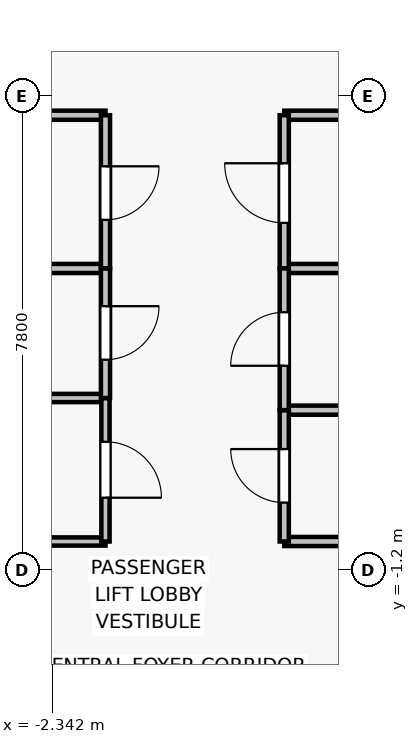
"""IFC4 building model, lengths in metres.
Left out: names, types, materials, properties, quantities, classifications, styles, units other than length and angle.
Written with IfcOpenShell. Run it as: python <this file> out.ifc"""

import sys

from ifc_helpers import new_model, si_unit, direction, frame, frame_2d, origin, place, context, subcontext, project, spatial, rectangle, extrude, source, transform, mapped, element, fill, save


model = new_model("IFC4")
c1 = context("Model", 3, precision=1e-05, world=origin(), true_north=direction((0.0, 1.0)))
c2 = subcontext(c1, "Body", "Model", "MODEL_VIEW")
j1 = project(units=[si_unit("LENGTHUNIT", "METRE"), si_unit("PLANEANGLEUNIT", "RADIAN")], contexts=[c1])
p1 = place(None, origin())
s1 = spatial("IfcSite", under=j1, at=p1, CompositionType="ELEMENT")
p2 = place(p1, origin())
s2 = spatial("IfcBuilding", under=s1, at=p2, CompositionType="ELEMENT")
p3 = place(p2, frame((0.0, 0.0, 225.4)))
s3 = spatial("IfcBuildingStorey", under=s2, at=p3, CompositionType="ELEMENT", Elevation=225.4)
for number, where, z_axis, x_axis in (
    (1, (-1.47, 3.76, 0.0), (0.0, 0.0, 1.0), (-1.0, 0.0, 0.0)),
    (2, (-3.87, 6.28, 0.0), (0.0, 0.0, 1.0), (1.0, 0.0, 0.0)),
):
    element("IfcWall", number, at=place(p3, frame(where, z_axis=z_axis, x_axis=x_axis)), inside=s3, PredefinedType="PARTITIONING", context=c2, shape_type="SweptSolid", body=[
        extrude(rectangle(XDim=2.4, YDim=0.15, at=frame_2d((1.2, 0.0))), origin(), (0.0, 0.0, 1.0), 3.075),
    ])
p4 = place(p3, frame((-1.47, 6.28, 0.0), z_axis=(0.0, 0.0, 1.0), x_axis=(0.0, -1.0, 0.0)))
e3 = element("IfcWall", 3, at=p4, inside=s3, PredefinedType="PARTITIONING", context=c2, shape_type="SweptSolid", body=[
    extrude(rectangle(XDim=2.52, YDim=0.15, at=frame_2d((1.26, 0.0))), origin(), (0.0, 0.0, 1.0), 3.075),
])
p5 = place(p4, frame((0.84, 0.0, 0.0)))
e4 = element("IfcOpeningElement", 4, at=p5, cuts=e3, PredefinedType="OPENING", context=c2, shape_type="SweptSolid", body=[
    extrude(rectangle(XDim=0.88, YDim=2.1, at=frame_2d((0.44, 1.05))), frame((0.0, 0.085, 0.0), z_axis=(0.0, -1.0, 0.0), x_axis=(1.0, 0.0, 0.0)), (0.0, 0.0, 1.0), 0.17),
])
for number, where, z_axis, x_axis in (
    (5, (6.38, 3.76, 0.0), (0.0, 0.0, 1.0), (-1.0, 0.0, 0.0)),
    (6, (1.47, 6.28, 0.0), (0.0, 0.0, 1.0), (1.0, 0.0, 0.0)),
):
    element("IfcWall", number, at=place(p3, frame(where, z_axis=z_axis, x_axis=x_axis)), inside=s3, PredefinedType="PARTITIONING", context=c2, shape_type="SweptSolid", body=[
        extrude(rectangle(XDim=4.91, YDim=0.15, at=frame_2d((2.455, 0.0))), origin(), (0.0, 0.0, 1.0), 3.075),
    ])
p6 = place(p3, frame((1.47, 3.76, 0.0), z_axis=(0.0, 0.0, 1.0), x_axis=(0.0, 1.0, 0.0)))
e7 = element("IfcWall", 7, at=p6, inside=s3, PredefinedType="PARTITIONING", context=c2, shape_type="SweptSolid", body=[
    extrude(rectangle(XDim=2.52, YDim=0.15, at=frame_2d((1.26, 0.0))), origin(), (0.0, 0.0, 1.0), 3.075),
])
p7 = place(p6, frame((0.75, 0.0, 0.0)))
e8 = element("IfcOpeningElement", 8, at=p7, cuts=e7, PredefinedType="OPENING", context=c2, shape_type="SweptSolid", body=[
    extrude(rectangle(XDim=0.98, YDim=2.15, at=frame_2d((0.49, 1.075))), frame((0.0, 0.085, 0.0), z_axis=(0.0, -1.0, 0.0), x_axis=(1.0, 0.0, 0.0)), (0.0, 0.0, 1.0), 0.17),
])
for number, where, z_axis, x_axis in (
    (9, (-1.47, -0.73, 0.0), (0.0, 0.0, 1.0), (-1.0, 0.0, 0.0)),
    (10, (-3.47, 1.63, 0.0), (0.0, 0.0, 1.0), (1.0, 0.0, 0.0)),
):
    element("IfcWall", number, at=place(p3, frame(where, z_axis=z_axis, x_axis=x_axis)), inside=s3, PredefinedType="PARTITIONING", context=c2, shape_type="SweptSolid", body=[
        extrude(rectangle(XDim=2.0, YDim=0.135, at=frame_2d((1.0, 0.0))), origin(), (0.0, 0.0, 1.0), 3.075),
    ])
p8 = place(p3, frame((-1.47, 1.63, 0.0), z_axis=(0.0, 0.0, 1.0), x_axis=(0.0, -1.0, 0.0)))
e11 = element("IfcWall", 11, at=p8, inside=s3, PredefinedType="PARTITIONING", context=c2, shape_type="SweptSolid", body=[
    extrude(rectangle(XDim=2.36, YDim=0.135, at=frame_2d((1.18, 0.0))), origin(), (0.0, 0.0, 1.0), 3.075),
])
p9 = place(p8, frame((0.72, 0.0, 0.0)))
e12 = element("IfcOpeningElement", 12, at=p9, cuts=e11, PredefinedType="OPENING", context=c2, shape_type="SweptSolid", body=[
    extrude(rectangle(XDim=0.92, YDim=2.1, at=frame_2d((0.46, 1.05))), frame((0.0, 0.077, 0.0), z_axis=(0.0, -1.0, 0.0), x_axis=(1.0, 0.0, 0.0)), (0.0, 0.0, 1.0), 0.155),
])
p10 = place(p3, frame((-1.47, 3.76, 0.0), z_axis=(0.0, 0.0, 1.0), x_axis=(0.0, -1.0, 0.0)))
e13 = element("IfcWall", 13, at=p10, inside=s3, PredefinedType="PARTITIONING", context=c2, shape_type="SweptSolid", body=[
    extrude(rectangle(XDim=2.13, YDim=0.15, at=frame_2d((1.065, 0.0))), origin(), (0.0, 0.0, 1.0), 3.075),
])
p11 = place(p10, frame((0.62, 0.0, 0.0)))
e14 = element("IfcOpeningElement", 14, at=p11, cuts=e13, PredefinedType="OPENING", context=c2, shape_type="SweptSolid", body=[
    extrude(rectangle(XDim=0.88, YDim=2.1, at=frame_2d((0.44, 1.05))), frame((0.0, 0.085, 0.0), z_axis=(0.0, -1.0, 0.0), x_axis=(1.0, 0.0, 0.0)), (0.0, 0.0, 1.0), 0.17),
])
for number, where, z_axis, x_axis in (
    (15, (3.68, -0.73, 0.0), (0.0, 0.0, 1.0), (-1.0, 0.0, 0.0)),
    (16, (1.47, 1.43, 0.0), (0.0, 0.0, 1.0), (1.0, 0.0, 0.0)),
):
    element("IfcWall", number, at=place(p3, frame(where, z_axis=z_axis, x_axis=x_axis)), inside=s3, PredefinedType="PARTITIONING", context=c2, shape_type="SweptSolid", body=[
        extrude(rectangle(XDim=2.21, YDim=0.15, at=frame_2d((1.105, 0.0))), origin(), (0.0, 0.0, 1.0), 3.075),
    ])
p12 = place(p3, frame((1.47, -0.73, 0.0), z_axis=(0.0, 0.0, 1.0), x_axis=(0.0, 1.0, 0.0)))
e17 = element("IfcWall", 17, at=p12, inside=s3, PredefinedType="PARTITIONING", context=c2, shape_type="SweptSolid", body=[
    extrude(rectangle(XDim=2.16, YDim=0.15, at=frame_2d((1.08, 0.0))), origin(), (0.0, 0.0, 1.0), 3.075),
])
p13 = place(p12, frame((0.64, 0.0, 0.0)))
e18 = element("IfcOpeningElement", 18, at=p13, cuts=e17, PredefinedType="OPENING", context=c2, shape_type="SweptSolid", body=[
    extrude(rectangle(XDim=0.88, YDim=2.1, at=frame_2d((0.44, 1.05))), frame((0.0, 0.085, 0.0), z_axis=(0.0, -1.0, 0.0), x_axis=(1.0, 0.0, 0.0)), (0.0, 0.0, 1.0), 0.17),
])
p14 = place(p3, frame((1.47, 1.43, 0.0), z_axis=(0.0, 0.0, 1.0), x_axis=(0.0, 1.0, 0.0)))
e19 = element("IfcWall", 19, at=p14, inside=s3, PredefinedType="PARTITIONING", context=c2, shape_type="SweptSolid", body=[
    extrude(rectangle(XDim=2.33, YDim=0.15, at=frame_2d((1.165, 0.0))), origin(), (0.0, 0.0, 1.0), 3.075),
])
p15 = place(p14, frame((0.73, 0.0, 0.0)))
e20 = element("IfcOpeningElement", 20, at=p15, cuts=e19, PredefinedType="OPENING", context=c2, shape_type="SweptSolid", body=[
    extrude(rectangle(XDim=0.88, YDim=2.15, at=frame_2d((0.44, 1.075))), frame((0.0, 0.085, 0.0), z_axis=(0.0, -1.0, 0.0), x_axis=(1.0, 0.0, 0.0)), (0.0, 0.0, 1.0), 0.17),
])
m1 = source(origin(), c2, "Body", "SweptSolid", [
    extrude(rectangle(XDim=0.88, YDim=2.1, at=frame_2d((0.44, 1.05))), frame((0.0, 0.025, 0.0), z_axis=(0.0, -1.0, 0.0), x_axis=(1.0, 0.0, 0.0)), (0.0, 0.0, 1.0), 0.05),
])
p16 = place(p5, origin())
e21 = element("IfcDoor", 21, at=p16, inside=s3, OperationType="SINGLE_SWING_LEFT", PredefinedType="DOOR", context=c2, shape_type="MappedRepresentation", body=[
    mapped(m1, transform((0.0, 0.0, 0.0), x_axis=(1.0, 0.0, 0.0), y_axis=(0.0, 1.0, 0.0), z_axis=(0.0, 0.0, 1.0), scale=1.0)),
])
fill(e4, e21)
m2 = source(origin(), c2, "Body", "SweptSolid", [
    extrude(rectangle(XDim=0.98, YDim=2.15, at=frame_2d((0.49, 1.075))), frame((0.0, 0.025, 0.0), z_axis=(0.0, -1.0, 0.0), x_axis=(1.0, 0.0, 0.0)), (0.0, 0.0, 1.0), 0.05),
])
p17 = place(p7, origin())
e22 = element("IfcDoor", 22, at=p17, inside=s3, OperationType="SINGLE_SWING_RIGHT", PredefinedType="DOOR", context=c2, shape_type="MappedRepresentation", body=[
    mapped(m2, transform((0.0, 0.0, 0.0), x_axis=(1.0, 0.0, 0.0), y_axis=(0.0, 1.0, 0.0), z_axis=(0.0, 0.0, 1.0), scale=1.0)),
])
fill(e8, e22)
m3 = source(origin(), c2, "Body", "SweptSolid", [
    extrude(rectangle(XDim=0.92, YDim=2.1, at=frame_2d((0.46, 1.05))), frame((0.0, 0.025, 0.0), z_axis=(0.0, -1.0, 0.0), x_axis=(1.0, 0.0, 0.0)), (0.0, 0.0, 1.0), 0.05),
])
p18 = place(p9, origin())
e23 = element("IfcDoor", 23, at=p18, inside=s3, OperationType="SINGLE_SWING_RIGHT", PredefinedType="DOOR", context=c2, shape_type="MappedRepresentation", body=[
    mapped(m3, transform((0.0, 0.0, 0.0), x_axis=(1.0, 0.0, 0.0), y_axis=(0.0, 1.0, 0.0), z_axis=(0.0, 0.0, 1.0), scale=1.0)),
])
fill(e12, e23)
p19 = place(p11, origin())
e24 = element("IfcDoor", 24, at=p19, inside=s3, OperationType="SINGLE_SWING_LEFT", PredefinedType="DOOR", context=c2, shape_type="MappedRepresentation", body=[
    mapped(m1, transform((0.0, 0.0, 0.0), x_axis=(1.0, 0.0, 0.0), y_axis=(0.0, 1.0, 0.0), z_axis=(0.0, 0.0, 1.0), scale=1.0)),
])
fill(e14, e24)
p20 = place(p13, origin())
e25 = element("IfcDoor", 25, at=p20, inside=s3, OperationType="SINGLE_SWING_RIGHT", PredefinedType="DOOR", context=c2, shape_type="MappedRepresentation", body=[
    mapped(m1, transform((0.0, 0.0, 0.0), x_axis=(1.0, 0.0, 0.0), y_axis=(0.0, 1.0, 0.0), z_axis=(0.0, 0.0, 1.0), scale=1.0)),
])
fill(e18, e25)
m4 = source(origin(), c2, "Body", "SweptSolid", [
    extrude(rectangle(XDim=0.88, YDim=2.15, at=frame_2d((0.44, 1.075))), frame((0.0, 0.025, 0.0), z_axis=(0.0, -1.0, 0.0), x_axis=(1.0, 0.0, 0.0)), (0.0, 0.0, 1.0), 0.05),
])
p21 = place(p15, origin())
e26 = element("IfcDoor", 26, at=p21, inside=s3, OperationType="SINGLE_SWING_LEFT", PredefinedType="DOOR", context=c2, shape_type="MappedRepresentation", body=[
    mapped(m4, transform((0.0, 0.0, 0.0), x_axis=(1.0, 0.0, 0.0), y_axis=(0.0, 1.0, 0.0), z_axis=(0.0, 0.0, 1.0), scale=1.0)),
])
fill(e20, e26)
save(model, sys.argv[1])
